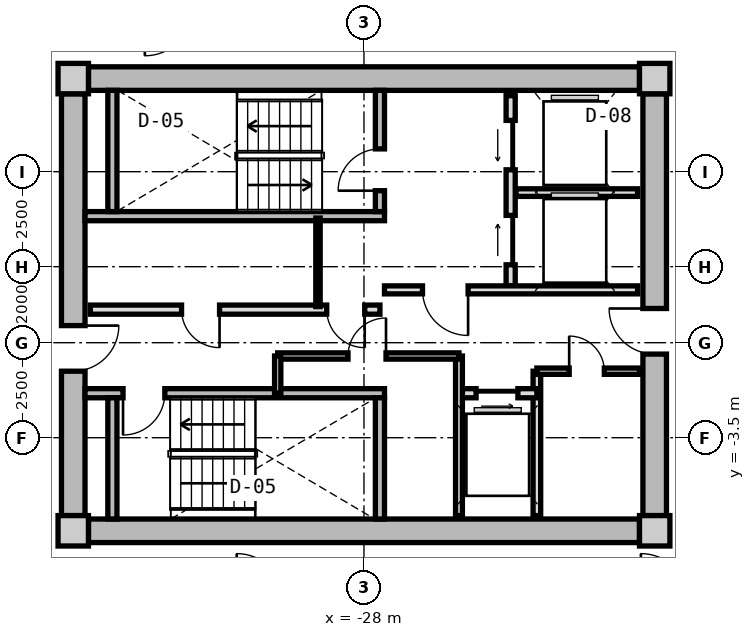
"""IFC4 building model, lengths in metres.
Left out: names, types, materials, properties, quantities, classifications, styles, units other than length and angle.
Written with IfcOpenShell. Run it as: python <this file> out.ifc"""

import sys

from ifc_helpers import new_model, si_unit, direction, frame, frame_2d, origin, origin_2d, place, context, subcontext, project, spatial, rectangle, extrude, source, transform, mapped, element, fill, save


model = new_model("IFC4")
c1 = context("Model", 3, precision=1e-05, world=origin(), true_north=direction((0.0, 1.0)))
c2 = subcontext(c1, "Body", "Model", "MODEL_VIEW")
j1 = project(units=[si_unit("LENGTHUNIT", "METRE"), si_unit("PLANEANGLEUNIT", "RADIAN")], contexts=[c1])
p1 = place(None, origin())
s1 = spatial("IfcSite", under=j1, at=p1, CompositionType="ELEMENT")
p2 = place(p1, origin())
s2 = spatial("IfcBuilding", under=s1, at=p2, CompositionType="ELEMENT")
p3 = place(p2, frame((0.0, 0.0, 177.0)))
s3 = spatial("IfcBuildingStorey", under=s2, at=p3, CompositionType="ELEMENT", Elevation=177.0)
m1 = source(origin(), c2, "Body", "SweptSolid", [
    extrude(rectangle(XDim=0.8, YDim=0.8, at=origin_2d()), origin(), (0.0, 0.0, 1.0), 3.05),
])
for number, where, z_axis, x_axis in (
    (1, (-35.65, -5.95, 0.0), (0.0, 0.0, 1.0), (1.0, 0.0, 0.0)),
    (2, (-20.35, -5.95, 0.0), (0.0, 0.0, 1.0), (1.0, 0.0, 0.0)),
    (3, (-20.35, 5.95, 0.0), (0.0, 0.0, 1.0), (1.0, 0.0, 0.0)),
    (4, (-35.65, 5.95, 0.0), (0.0, 0.0, 1.0), (1.0, 0.0, 0.0)),
):
    element("IfcColumn", number, at=place(p3, frame(where, z_axis=z_axis, x_axis=x_axis)), inside=s3, PredefinedType="COLUMN", context=c2, shape_type="MappedRepresentation", body=[
        mapped(m1, transform((0.0, 0.0, 0.0), x_axis=(1.0, 0.0, 0.0), y_axis=(0.0, 1.0, 0.0), z_axis=(0.0, 0.0, 1.0), scale=1.0)),
    ])
m2 = source(origin(), c2, "Body", "SweptSolid", [
    extrude(rectangle(XDim=14.5, YDim=0.62, at=frame_2d((7.25, 0.0))), origin(), (0.0, 0.0, 1.0), 2.81),
])
for number, where, z_axis, x_axis in (
    (5, (-35.25, 5.95, 0.0), (0.0, 0.0, 1.0), (1.0, 0.0, 0.0)),
    (6, (-20.75, -5.95, 0.0), (0.0, 0.0, 1.0), (-1.0, 0.0, 0.0)),
):
    element("IfcWall", number, at=place(p3, frame(where, z_axis=z_axis, x_axis=x_axis)), inside=s3, PredefinedType="SHEAR", context=c2, shape_type="MappedRepresentation", body=[
        mapped(m2, transform((0.0, 0.0, 0.0), x_axis=(1.0, 0.0, 0.0), y_axis=(0.0, 1.0, 0.0), z_axis=(0.0, 0.0, 1.0), scale=1.0)),
    ])
m3 = source(origin(), c2, "Body", "SweptSolid", [
    extrude(rectangle(XDim=11.1, YDim=0.62, at=frame_2d((5.55, 0.0))), origin(), (0.0, 0.0, 1.0), 2.81),
])
p4 = place(p3, frame((-35.65, -5.55, 0.0), z_axis=(0.0, 0.0, 1.0), x_axis=(0.0, 1.0, 0.0)))
e7 = element("IfcWall", 7, at=p4, inside=s3, PredefinedType="SHEAR", context=c2, shape_type="MappedRepresentation", body=[
    mapped(m3, transform((0.0, 0.0, 0.0), x_axis=(1.0, 0.0, 0.0), y_axis=(0.0, 1.0, 0.0), z_axis=(0.0, 0.0, 1.0), scale=1.0)),
])
p5 = place(p4, frame((3.8, 0.0, 0.0)))
e8 = element("IfcOpeningElement", 8, at=p5, cuts=e7, PredefinedType="OPENING", context=c2, shape_type="SweptSolid", body=[
    extrude(rectangle(XDim=1.2, YDim=2.15, at=frame_2d((0.6, 1.075))), frame((0.0, 0.32, 0.0), z_axis=(0.0, -1.0, 0.0), x_axis=(1.0, 0.0, 0.0)), (0.0, 0.0, 1.0), 0.64),
])
p6 = place(p3, frame((-20.35, 5.55, 0.0), z_axis=(0.0, 0.0, 1.0), x_axis=(0.0, -1.0, 0.0)))
e9 = element("IfcWall", 9, at=p6, inside=s3, PredefinedType="SHEAR", context=c2, shape_type="MappedRepresentation", body=[
    mapped(m3, transform((0.0, 0.0, 0.0), x_axis=(1.0, 0.0, 0.0), y_axis=(0.0, 1.0, 0.0), z_axis=(0.0, 0.0, 1.0), scale=1.0)),
])
p7 = place(p6, frame((5.65, 0.0, 0.0)))
e10 = element("IfcOpeningElement", 10, at=p7, cuts=e9, PredefinedType="OPENING", context=c2, shape_type="SweptSolid", body=[
    extrude(rectangle(XDim=1.2, YDim=2.15, at=frame_2d((0.6, 1.075))), frame((0.0, 0.32, 0.0), z_axis=(0.0, -1.0, 0.0), x_axis=(1.0, 0.0, 0.0)), (0.0, 0.0, 1.0), 0.64),
])
m4 = source(origin(), c2, "Body", "SweptSolid", [
    extrude(rectangle(XDim=7.88, YDim=0.24, at=frame_2d((3.94, 0.0))), origin(), (0.0, 0.0, 1.0), 2.81),
])
p8 = place(p3, frame((-35.34, 2.33, 0.0), z_axis=(0.0, 0.0, 1.0), x_axis=(1.0, 0.0, 0.0)))
e11 = element("IfcWall", 11, at=p8, inside=s3, PredefinedType="PARTITIONING", context=c2, shape_type="MappedRepresentation", body=[
    mapped(m4, transform((0.0, 0.0, 0.0), x_axis=(1.0, 0.0, 0.0), y_axis=(0.0, 1.0, 0.0), z_axis=(0.0, 0.0, 1.0), scale=1.0)),
])
m5 = source(origin(), c2, "Body", "SweptSolid", [
    extrude(rectangle(XDim=3.19, YDim=0.24, at=frame_2d((1.595, 0.0))), origin(), (0.0, 0.0, 1.0), 2.81),
])
p9 = place(p3, frame((-34.62, 2.45, 0.0), z_axis=(0.0, 0.0, 1.0), x_axis=(0.0, 1.0, 0.0)))
e12 = element("IfcWall", 12, at=p9, inside=s3, PredefinedType="PARTITIONING", context=c2, shape_type="MappedRepresentation", body=[
    mapped(m5, transform((0.0, 0.0, 0.0), x_axis=(1.0, 0.0, 0.0), y_axis=(0.0, 1.0, 0.0), z_axis=(0.0, 0.0, 1.0), scale=1.0)),
])
p10 = place(p3, frame((-27.58, 2.45, 0.0), z_axis=(0.0, 0.0, 1.0), x_axis=(0.0, 1.0, 0.0)))
e13 = element("IfcWall", 13, at=p10, inside=s3, PredefinedType="PARTITIONING", context=c2, shape_type="MappedRepresentation", body=[
    mapped(m5, transform((0.0, 0.0, 0.0), x_axis=(1.0, 0.0, 0.0), y_axis=(0.0, 1.0, 0.0), z_axis=(0.0, 0.0, 1.0), scale=1.0)),
])
p11 = place(p10, frame((0.55, 0.0, 0.0)))
e14 = element("IfcOpeningElement", 14, at=p11, cuts=e13, PredefinedType="OPENING", context=c2, shape_type="SweptSolid", body=[
    extrude(rectangle(XDim=1.1, YDim=2.15, at=frame_2d((0.55, 1.075))), frame((0.0, 0.13, 0.0), z_axis=(0.0, -1.0, 0.0), x_axis=(1.0, 0.0, 0.0)), (0.0, 0.0, 1.0), 0.26),
])
p12 = place(p3, frame((-35.34, -2.33, 0.0), z_axis=(0.0, 0.0, 1.0), x_axis=(1.0, 0.0, 0.0)))
e15 = element("IfcWall", 15, at=p12, inside=s3, PredefinedType="PARTITIONING", context=c2, shape_type="MappedRepresentation", body=[
    mapped(m4, transform((0.0, 0.0, 0.0), x_axis=(1.0, 0.0, 0.0), y_axis=(0.0, 1.0, 0.0), z_axis=(0.0, 0.0, 1.0), scale=1.0)),
])
p13 = place(p12, frame((1.0, 0.0, 0.0)))
e16 = element("IfcOpeningElement", 16, at=p13, cuts=e15, PredefinedType="OPENING", context=c2, shape_type="SweptSolid", body=[
    extrude(rectangle(XDim=1.1, YDim=2.15, at=frame_2d((0.55, 1.075))), frame((0.0, 0.13, 0.0), z_axis=(0.0, -1.0, 0.0), x_axis=(1.0, 0.0, 0.0)), (0.0, 0.0, 1.0), 0.26),
])
for number, where, z_axis, x_axis in (
    (17, (-34.62, -5.64, 0.0), (0.0, 0.0, 1.0), (0.0, 1.0, 0.0)),
    (18, (-27.58, -5.64, 0.0), (0.0, 0.0, 1.0), (0.0, 1.0, 0.0)),
):
    element("IfcWall", number, at=place(p3, frame(where, z_axis=z_axis, x_axis=x_axis)), inside=s3, PredefinedType="PARTITIONING", context=c2, shape_type="MappedRepresentation", body=[
        mapped(m5, transform((0.0, 0.0, 0.0), x_axis=(1.0, 0.0, 0.0), y_axis=(0.0, 1.0, 0.0), z_axis=(0.0, 0.0, 1.0), scale=1.0)),
    ])
m6 = source(origin(), c2, "Body", "SweptSolid", [
    extrude(rectangle(XDim=5.0, YDim=0.24, at=frame_2d((2.5, 0.0))), origin(), (0.0, 0.0, 1.0), 2.795),
])
p14 = place(p3, frame((-24.14, 0.5, 0.0), z_axis=(0.0, 0.0, 1.0), x_axis=(0.0, 1.0, 0.0)))
e19 = element("IfcWall", 19, at=p14, inside=s3, PredefinedType="PARTITIONING", context=c2, shape_type="MappedRepresentation", body=[
    mapped(m6, transform((0.0, 0.0, 0.0), x_axis=(1.0, 0.0, 0.0), y_axis=(0.0, 1.0, 0.0), z_axis=(0.0, 0.0, 1.0), scale=1.0)),
])
p15 = place(p14, frame((3.05, 0.0, 0.0)))
e20 = element("IfcOpeningElement", 20, at=p15, cuts=e19, PredefinedType="OPENING", context=c2, shape_type="SweptSolid", body=[
    extrude(rectangle(XDim=1.3, YDim=2.2, at=frame_2d((0.65, 1.1))), frame((0.0, 0.13, 0.0), z_axis=(0.0, -1.0, 0.0), x_axis=(1.0, 0.0, 0.0)), (0.0, 0.0, 1.0), 0.26),
])
p16 = place(p14, frame((0.55, 0.0, 0.0)))
e21 = element("IfcOpeningElement", 21, at=p16, cuts=e19, PredefinedType="OPENING", context=c2, shape_type="SweptSolid", body=[
    extrude(rectangle(XDim=1.3, YDim=2.2, at=frame_2d((0.65, 1.1))), frame((0.0, 0.13, 0.0), z_axis=(0.0, -1.0, 0.0), x_axis=(1.0, 0.0, 0.0)), (0.0, 0.0, 1.0), 0.26),
])
m7 = source(origin(), c2, "Body", "SweptSolid", [
    extrude(rectangle(XDim=3.2, YDim=0.2, at=frame_2d((1.6, 0.0))), origin(), (0.0, 0.0, 1.0), 2.795),
])
p17 = place(p3, frame((-24.0, 2.95, 0.0), z_axis=(0.0, 0.0, 1.0), x_axis=(1.0, 0.0, 0.0)))
e22 = element("IfcWall", 22, at=p17, inside=s3, PredefinedType="PARTITIONING", context=c2, shape_type="MappedRepresentation", body=[
    mapped(m7, transform((0.0, 0.0, 0.0), x_axis=(1.0, 0.0, 0.0), y_axis=(0.0, 1.0, 0.0), z_axis=(0.0, 0.0, 1.0), scale=1.0)),
])
m8 = source(origin(), c2, "Body", "SweptSolid", [
    extrude(rectangle(XDim=6.66, YDim=0.21, at=frame_2d((3.33, 0.0))), origin(), (0.0, 0.0, 1.0), 2.795),
])
p18 = place(p3, frame((-27.46, 0.39, 0.0), z_axis=(0.0, 0.0, 1.0), x_axis=(1.0, 0.0, 0.0)))
e23 = element("IfcWall", 23, at=p18, inside=s3, PredefinedType="PARTITIONING", context=c2, shape_type="MappedRepresentation", body=[
    mapped(m8, transform((0.0, 0.0, 0.0), x_axis=(1.0, 0.0, 0.0), y_axis=(0.0, 1.0, 0.0), z_axis=(0.0, 0.0, 1.0), scale=1.0)),
])
p19 = place(p18, frame((1.0, 0.0, 0.0)))
e24 = element("IfcOpeningElement", 24, at=p19, cuts=e23, PredefinedType="OPENING", context=c2, shape_type="SweptSolid", body=[
    extrude(rectangle(XDim=1.2, YDim=2.15, at=frame_2d((0.6, 1.075))), frame((0.0, 0.115, 0.0), z_axis=(0.0, -1.0, 0.0), x_axis=(1.0, 0.0, 0.0)), (0.0, 0.0, 1.0), 0.23),
])
m9 = source(origin(), c2, "Body", "SweptSolid", [
    extrude(rectangle(XDim=7.62, YDim=0.24, at=frame_2d((3.81, 0.0))), origin(), (0.0, 0.0, 1.0), 2.795),
])
p20 = place(p3, frame((-35.2, -0.13, 0.0), z_axis=(0.0, 0.0, 1.0), x_axis=(1.0, 0.0, 0.0)))
e25 = element("IfcWall", 25, at=p20, inside=s3, PredefinedType="PARTITIONING", context=c2, shape_type="MappedRepresentation", body=[
    mapped(m9, transform((0.0, 0.0, 0.0), x_axis=(1.0, 0.0, 0.0), y_axis=(0.0, 1.0, 0.0), z_axis=(0.0, 0.0, 1.0), scale=1.0)),
])
p21 = place(p20, frame((6.22, 0.0, 0.0)))
e26 = element("IfcOpeningElement", 26, at=p21, cuts=e25, PredefinedType="OPENING", context=c2, shape_type="SweptSolid", body=[
    extrude(rectangle(XDim=1.0, YDim=2.1, at=frame_2d((0.5, 1.05))), frame((0.0, 0.13, 0.0), z_axis=(0.0, -1.0, 0.0), x_axis=(1.0, 0.0, 0.0)), (0.0, 0.0, 1.0), 0.26),
])
p22 = place(p20, frame((2.4, 0.0, 0.0)))
e27 = element("IfcOpeningElement", 27, at=p22, cuts=e25, PredefinedType="OPENING", context=c2, shape_type="SweptSolid", body=[
    extrude(rectangle(XDim=1.0, YDim=2.1, at=frame_2d((0.5, 1.05))), frame((0.0, 0.13, 0.0), z_axis=(0.0, -1.0, 0.0), x_axis=(1.0, 0.0, 0.0)), (0.0, 0.0, 1.0), 0.26),
])
m10 = source(origin(), c2, "Body", "SweptSolid", [
    extrude(rectangle(XDim=2.33, YDim=0.115, at=frame_2d((1.165, 0.0))), origin(), (0.0, 0.0, 1.0), 2.795),
])
p23 = place(p3, frame((-29.21, -0.05, 0.0), z_axis=(0.0, 0.0, 1.0), x_axis=(0.0, 1.0, 0.0)))
e28 = element("IfcWall", 28, at=p23, inside=s3, PredefinedType="PARTITIONING", context=c2, shape_type="MappedRepresentation", body=[
    mapped(m10, transform((0.0, 0.0, 0.0), x_axis=(1.0, 0.0, 0.0), y_axis=(0.0, 1.0, 0.0), z_axis=(0.0, 0.0, 1.0), scale=1.0)),
])
m11 = source(origin(), c2, "Body", "SweptSolid", [
    extrude(rectangle(XDim=3.8, YDim=0.2, at=frame_2d((1.9, 0.0))), origin(), (0.0, 0.0, 1.0), 2.795),
])
p24 = place(p3, frame((-23.45, -5.55, 0.0), z_axis=(0.0, 0.0, 1.0), x_axis=(0.0, 1.0, 0.0)))
e29 = element("IfcWall", 29, at=p24, inside=s3, PredefinedType="PARTITIONING", context=c2, shape_type="MappedRepresentation", body=[
    mapped(m11, transform((0.0, 0.0, 0.0), x_axis=(1.0, 0.0, 0.0), y_axis=(0.0, 1.0, 0.0), z_axis=(0.0, 0.0, 1.0), scale=1.0)),
])
m12 = source(origin(), c2, "Body", "SweptSolid", [
    extrude(rectangle(XDim=2.05, YDim=0.24, at=frame_2d((1.025, 0.0))), origin(), (0.0, 0.0, 1.0), 2.795),
])
p25 = place(p3, frame((-25.5, -2.33, 0.0), z_axis=(0.0, 0.0, 1.0), x_axis=(1.0, 0.0, 0.0)))
e30 = element("IfcWall", 30, at=p25, inside=s3, PredefinedType="PARTITIONING", context=c2, shape_type="MappedRepresentation", body=[
    mapped(m12, transform((0.0, 0.0, 0.0), x_axis=(1.0, 0.0, 0.0), y_axis=(0.0, 1.0, 0.0), z_axis=(0.0, 0.0, 1.0), scale=1.0)),
])
p26 = place(p25, frame((0.45, 0.0, 0.0)))
e31 = element("IfcOpeningElement", 31, at=p26, cuts=e30, PredefinedType="OPENING", context=c2, shape_type="SweptSolid", body=[
    extrude(rectangle(XDim=1.1, YDim=2.2, at=frame_2d((0.55, 1.1))), frame((0.0, 0.13, 0.0), z_axis=(0.0, -1.0, 0.0), x_axis=(1.0, 0.0, 0.0)), (0.0, 0.0, 1.0), 0.26),
])
m13 = source(origin(), c2, "Body", "SweptSolid", [
    extrude(rectangle(XDim=4.2, YDim=0.18, at=frame_2d((2.1, 0.0))), origin(), (0.0, 0.0, 1.0), 2.795),
])
p27 = place(p3, frame((-25.5, -5.55, 0.0), z_axis=(0.0, 0.0, 1.0), x_axis=(0.0, 1.0, 0.0)))
e32 = element("IfcWall", 32, at=p27, inside=s3, PredefinedType="PARTITIONING", context=c2, shape_type="MappedRepresentation", body=[
    mapped(m13, transform((0.0, 0.0, 0.0), x_axis=(1.0, 0.0, 0.0), y_axis=(0.0, 1.0, 0.0), z_axis=(0.0, 0.0, 1.0), scale=1.0)),
])
m14 = source(origin(), c2, "Body", "SweptSolid", [
    extrude(rectangle(XDim=4.77, YDim=0.165, at=frame_2d((2.385, 0.0))), origin(), (0.0, 0.0, 1.0), 2.795),
])
p28 = place(p3, frame((-30.27, -1.35, 0.0), z_axis=(0.0, 0.0, 1.0), x_axis=(1.0, 0.0, 0.0)))
e33 = element("IfcWall", 33, at=p28, inside=s3, PredefinedType="PARTITIONING", context=c2, shape_type="MappedRepresentation", body=[
    mapped(m14, transform((0.0, 0.0, 0.0), x_axis=(1.0, 0.0, 0.0), y_axis=(0.0, 1.0, 0.0), z_axis=(0.0, 0.0, 1.0), scale=1.0)),
])
p29 = place(p28, frame((1.85, 0.0, 0.0)))
e34 = element("IfcOpeningElement", 34, at=p29, cuts=e33, PredefinedType="OPENING", context=c2, shape_type="SweptSolid", body=[
    extrude(rectangle(XDim=1.0, YDim=2.1, at=frame_2d((0.5, 1.05))), frame((0.0, 0.093, 0.0), z_axis=(0.0, -1.0, 0.0), x_axis=(1.0, 0.0, 0.0)), (0.0, 0.0, 1.0), 0.185),
])
m15 = source(origin(), c2, "Body", "SweptSolid", [
    extrude(rectangle(XDim=0.98, YDim=0.165, at=frame_2d((0.49, 0.0))), origin(), (0.0, 0.0, 1.0), 2.795),
])
p30 = place(p3, frame((-30.27, -2.33, 0.0), z_axis=(0.0, 0.0, 1.0), x_axis=(0.0, 1.0, 0.0)))
e35 = element("IfcWall", 35, at=p30, inside=s3, PredefinedType="PARTITIONING", context=c2, shape_type="MappedRepresentation", body=[
    mapped(m15, transform((0.0, 0.0, 0.0), x_axis=(1.0, 0.0, 0.0), y_axis=(0.0, 1.0, 0.0), z_axis=(0.0, 0.0, 1.0), scale=1.0)),
])
m16 = source(origin(), c2, "Body", "SweptSolid", [
    extrude(rectangle(XDim=2.7, YDim=0.165, at=frame_2d((1.35, 0.0))), origin(), (0.0, 0.0, 1.0), 2.795),
])
p31 = place(p3, frame((-23.45, -1.75, 0.0), z_axis=(0.0, 0.0, 1.0), x_axis=(1.0, 0.0, 0.0)))
e36 = element("IfcWall", 36, at=p31, inside=s3, PredefinedType="PARTITIONING", context=c2, shape_type="MappedRepresentation", body=[
    mapped(m16, transform((0.0, 0.0, 0.0), x_axis=(1.0, 0.0, 0.0), y_axis=(0.0, 1.0, 0.0), z_axis=(0.0, 0.0, 1.0), scale=1.0)),
])
p32 = place(p31, frame((0.85, 0.0, 0.0)))
e37 = element("IfcOpeningElement", 37, at=p32, cuts=e36, PredefinedType="OPENING", context=c2, shape_type="SweptSolid", body=[
    extrude(rectangle(XDim=0.925, YDim=2.1, at=frame_2d((0.462, 1.05))), frame((0.0, 0.093, 0.0), z_axis=(0.0, -1.0, 0.0), x_axis=(1.0, 0.0, 0.0)), (0.0, 0.0, 1.0), 0.185),
])
m17 = source(origin(), c2, "Body", "SweptSolid", [
    extrude(rectangle(XDim=1.1, YDim=2.15, at=frame_2d((0.55, 1.075))), frame((0.0, 0.025, 0.0), z_axis=(0.0, -1.0, 0.0), x_axis=(1.0, 0.0, 0.0)), (0.0, 0.0, 1.0), 0.05),
])
p33 = place(p11, origin())
e38 = element("IfcDoor", 38, at=p33, inside=s3, OperationType="SINGLE_SWING_LEFT", PredefinedType="DOOR", context=c2, shape_type="MappedRepresentation", body=[
    mapped(m17, transform((0.0, 0.0, 0.0), x_axis=(1.0, 0.0, 0.0), y_axis=(0.0, 1.0, 0.0), z_axis=(0.0, 0.0, 1.0), scale=1.0)),
])
fill(e14, e38)
p34 = place(p13, frame((1.1, 0.0, 0.0), z_axis=(0.0, 0.0, 1.0), x_axis=(-1.0, 0.0, 0.0)))
e39 = element("IfcDoor", 39, at=p34, inside=s3, OperationType="SINGLE_SWING_RIGHT", PredefinedType="DOOR", context=c2, shape_type="MappedRepresentation", body=[
    mapped(m17, transform((0.0, 0.0, 0.0), x_axis=(1.0, 0.0, 0.0), y_axis=(0.0, 1.0, 0.0), z_axis=(0.0, 0.0, 1.0), scale=1.0)),
])
fill(e16, e39)
m18 = source(origin(), c2, "Body", "SweptSolid", [
    extrude(rectangle(XDim=1.3, YDim=2.2, at=frame_2d((0.65, 1.1))), frame((0.0, 0.025, 0.0), z_axis=(0.0, -1.0, 0.0), x_axis=(1.0, 0.0, 0.0)), (0.0, 0.0, 1.0), 0.05),
])
p35 = place(p15, origin())
e40 = element("IfcDoor", 40, at=p35, inside=s3, OperationType="SLIDING_TO_LEFT", PredefinedType="DOOR", context=c2, shape_type="MappedRepresentation", body=[
    mapped(m18, transform((0.0, 0.0, 0.0), x_axis=(1.0, 0.0, 0.0), y_axis=(0.0, 1.0, 0.0), z_axis=(0.0, 0.0, 1.0), scale=1.0)),
])
fill(e20, e40)
p36 = place(p16, origin())
e41 = element("IfcDoor", 41, at=p36, inside=s3, OperationType="SLIDING_TO_RIGHT", PredefinedType="DOOR", context=c2, shape_type="MappedRepresentation", body=[
    mapped(m18, transform((0.0, 0.0, 0.0), x_axis=(1.0, 0.0, 0.0), y_axis=(0.0, 1.0, 0.0), z_axis=(0.0, 0.0, 1.0), scale=1.0)),
])
fill(e21, e41)
m19 = source(origin(), c2, "Body", "SweptSolid", [
    extrude(rectangle(XDim=1.2, YDim=2.15, at=frame_2d((0.6, 1.075))), frame((0.0, 0.025, 0.0), z_axis=(0.0, -1.0, 0.0), x_axis=(1.0, 0.0, 0.0)), (0.0, 0.0, 1.0), 0.05),
])
p37 = place(p19, frame((1.2, 0.0, 0.0), z_axis=(0.0, 0.0, 1.0), x_axis=(-1.0, 0.0, 0.0)))
e42 = element("IfcDoor", 42, at=p37, inside=s3, OperationType="SINGLE_SWING_LEFT", PredefinedType="DOOR", context=c2, shape_type="MappedRepresentation", body=[
    mapped(m19, transform((0.0, 0.0, 0.0), x_axis=(1.0, 0.0, 0.0), y_axis=(0.0, 1.0, 0.0), z_axis=(0.0, 0.0, 1.0), scale=1.0)),
])
fill(e24, e42)
p38 = place(p5, frame((1.2, 0.0, 0.0), z_axis=(0.0, 0.0, 1.0), x_axis=(-1.0, 0.0, 0.0)))
e43 = element("IfcDoor", 43, at=p38, inside=s3, OperationType="SINGLE_SWING_LEFT", PredefinedType="DOOR", context=c2, shape_type="MappedRepresentation", body=[
    mapped(m19, transform((0.0, 0.0, 0.0), x_axis=(1.0, 0.0, 0.0), y_axis=(0.0, 1.0, 0.0), z_axis=(0.0, 0.0, 1.0), scale=1.0)),
])
fill(e8, e43)
p39 = place(p7, frame((1.2, 0.0, 0.0), z_axis=(0.0, 0.0, 1.0), x_axis=(-1.0, 0.0, 0.0)))
e44 = element("IfcDoor", 44, at=p39, inside=s3, OperationType="SINGLE_SWING_RIGHT", PredefinedType="DOOR", context=c2, shape_type="MappedRepresentation", body=[
    mapped(m19, transform((0.0, 0.0, 0.0), x_axis=(1.0, 0.0, 0.0), y_axis=(0.0, 1.0, 0.0), z_axis=(0.0, 0.0, 1.0), scale=1.0)),
])
fill(e10, e44)
m20 = source(origin(), c2, "Body", "SweptSolid", [
    extrude(rectangle(XDim=1.0, YDim=2.1, at=frame_2d((0.5, 1.05))), frame((0.0, 0.025, 0.0), z_axis=(0.0, -1.0, 0.0), x_axis=(1.0, 0.0, 0.0)), (0.0, 0.0, 1.0), 0.05),
])
p40 = place(p21, frame((1.0, 0.0, 0.0), z_axis=(0.0, 0.0, 1.0), x_axis=(-1.0, 0.0, 0.0)))
e45 = element("IfcDoor", 45, at=p40, inside=s3, OperationType="SINGLE_SWING_LEFT", PredefinedType="DOOR", context=c2, shape_type="MappedRepresentation", body=[
    mapped(m20, transform((0.0, 0.0, 0.0), x_axis=(1.0, 0.0, 0.0), y_axis=(0.0, 1.0, 0.0), z_axis=(0.0, 0.0, 1.0), scale=1.0)),
])
fill(e26, e45)
p41 = place(p22, frame((1.0, 0.0, 0.0), z_axis=(0.0, 0.0, 1.0), x_axis=(-1.0, 0.0, 0.0)))
e46 = element("IfcDoor", 46, at=p41, inside=s3, OperationType="SINGLE_SWING_LEFT", PredefinedType="DOOR", context=c2, shape_type="MappedRepresentation", body=[
    mapped(m20, transform((0.0, 0.0, 0.0), x_axis=(1.0, 0.0, 0.0), y_axis=(0.0, 1.0, 0.0), z_axis=(0.0, 0.0, 1.0), scale=1.0)),
])
fill(e27, e46)
m21 = source(origin(), c2, "Body", "SweptSolid", [
    extrude(rectangle(XDim=1.1, YDim=2.2, at=frame_2d((0.55, 1.1))), frame((0.0, 0.025, 0.0), z_axis=(0.0, -1.0, 0.0), x_axis=(1.0, 0.0, 0.0)), (0.0, 0.0, 1.0), 0.05),
])
p42 = place(p26, frame((1.1, 0.0, 0.0), z_axis=(0.0, 0.0, 1.0), x_axis=(-1.0, 0.0, 0.0)))
e47 = element("IfcDoor", 47, at=p42, inside=s3, OperationType="SLIDING_TO_RIGHT", PredefinedType="DOOR", context=c2, shape_type="MappedRepresentation", body=[
    mapped(m21, transform((0.0, 0.0, 0.0), x_axis=(1.0, 0.0, 0.0), y_axis=(0.0, 1.0, 0.0), z_axis=(0.0, 0.0, 1.0), scale=1.0)),
])
fill(e31, e47)
p43 = place(p29, origin())
e48 = element("IfcDoor", 48, at=p43, inside=s3, OperationType="SINGLE_SWING_RIGHT", PredefinedType="DOOR", context=c2, shape_type="MappedRepresentation", body=[
    mapped(m20, transform((0.0, 0.0, 0.0), x_axis=(1.0, 0.0, 0.0), y_axis=(0.0, 1.0, 0.0), z_axis=(0.0, 0.0, 1.0), scale=1.0)),
])
fill(e34, e48)
m22 = source(origin(), c2, "Body", "SweptSolid", [
    extrude(rectangle(XDim=0.925, YDim=2.1, at=frame_2d((0.462, 1.05))), frame((0.0, 0.025, 0.0), z_axis=(0.0, -1.0, 0.0), x_axis=(1.0, 0.0, 0.0)), (0.0, 0.0, 1.0), 0.05),
])
p44 = place(p32, origin())
e49 = element("IfcDoor", 49, at=p44, inside=s3, OperationType="SINGLE_SWING_LEFT", PredefinedType="DOOR", context=c2, shape_type="MappedRepresentation", body=[
    mapped(m22, transform((0.0, 0.0, 0.0), x_axis=(1.0, 0.0, 0.0), y_axis=(0.0, 1.0, 0.0), z_axis=(0.0, 0.0, 1.0), scale=1.0)),
])
fill(e37, e49)
save(model, sys.argv[1])
